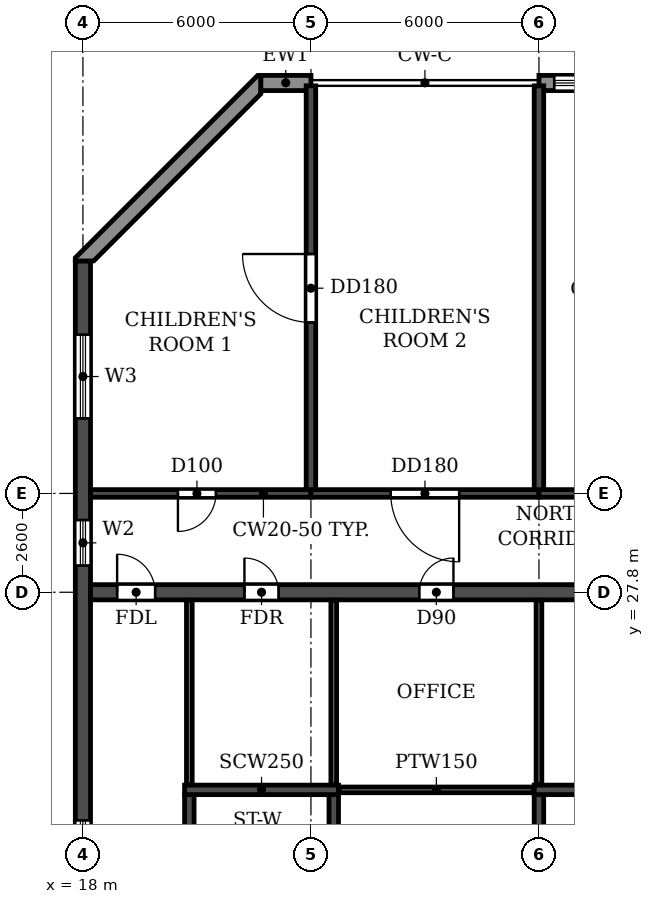
"""IFC4 building model, lengths in metres.
Left out: names, types, materials, properties, quantities, classifications, styles, units other than length and angle.
Written with IfcOpenShell. Run it as: python <this file> out.ifc"""

import sys

from ifc_helpers import new_model, si_unit, direction, frame, frame_2d, origin, place, context, subcontext, project, spatial, polyline, rectangle, outline, extrude, element, fill, save


model = new_model("IFC4")
c1 = context("Model", 3, precision=1e-05, world=origin(), true_north=direction((0.0, 1.0)))
c2 = subcontext(c1, "Body", "Model", "MODEL_VIEW")
j1 = project(units=[si_unit("LENGTHUNIT", "METRE"), si_unit("PLANEANGLEUNIT", "RADIAN")], contexts=[c1])
p1 = place(None, origin())
s1 = spatial("IfcSite", under=j1, at=p1, CompositionType="ELEMENT")
p2 = place(p1, origin())
s2 = spatial("IfcBuilding", under=s1, at=p2, CompositionType="ELEMENT")
p3 = place(p2, frame((0.0, 0.0, 211.5)))
s3 = spatial("IfcBuildingStorey", under=s2, at=p3, CompositionType="ELEMENT", Elevation=211.5)
p4 = place(p3, frame((24.0, 30.5, 0.0), z_axis=(0.0, 0.0, 1.0), x_axis=(0.0, 1.0, 0.0)))
e1 = element("IfcWall", 1, at=p4, inside=s3, PredefinedType="SHEAR", context=c2, shape_type="SweptSolid", body=[
    extrude(rectangle(XDim=10.625, YDim=0.25, at=frame_2d((5.312, 0.0))), origin(), (0.0, 0.0, 1.0), 2.95),
])
p5 = place(p4, frame((4.4, 0.0, 0.0)))
e2 = element("IfcOpeningElement", 2, at=p5, cuts=e1, PredefinedType="OPENING", context=c2, shape_type="SweptSolid", body=[
    extrude(rectangle(XDim=1.8, YDim=2.1, at=frame_2d((0.9, 1.05))), frame((0.0, 0.135, 0.0), z_axis=(0.0, -1.0, 0.0), x_axis=(1.0, 0.0, 0.0)), (0.0, 0.0, 1.0), 0.27),
])
p6 = place(p3, frame((30.0, 30.5, 0.0), z_axis=(0.0, 0.0, 1.0), x_axis=(0.0, 1.0, 0.0)))
e3 = element("IfcWall", 3, at=p6, inside=s3, PredefinedType="SHEAR", context=c2, shape_type="SweptSolid", body=[
    extrude(rectangle(XDim=10.625, YDim=0.25, at=frame_2d((5.312, 0.0))), origin(), (0.0, 0.0, 1.0), 2.95),
])
p7 = place(p3, frame((18.0, 4.683, 0.0), z_axis=(0.0, 0.0, 1.0), x_axis=(0.0, 1.0, 0.0)))
e4 = element("IfcWall", 4, at=p7, inside=s3, PredefinedType="SHEAR", context=c2, shape_type="SweptSolid", body=[
    extrude(rectangle(XDim=31.834, YDim=0.4, at=frame_2d((15.917, 0.0))), origin(), (0.0, 0.0, 1.0), 2.95),
])
p8 = place(p7, frame((23.817, 0.0, 0.9)))
e5 = element("IfcOpeningElement", 5, at=p8, cuts=e4, PredefinedType="OPENING", context=c2, shape_type="SweptSolid", body=[
    extrude(rectangle(XDim=1.2, YDim=1.5, at=frame_2d((0.6, 0.75))), frame((0.0, 0.21, 0.0), z_axis=(0.0, -1.0, 0.0), x_axis=(1.0, 0.0, 0.0)), (0.0, 0.0, 1.0), 0.42),
])
p9 = place(p7, frame((8.017, 0.0, 0.9)))
e6 = element("IfcOpeningElement", 6, at=p9, cuts=e4, PredefinedType="OPENING", context=c2, shape_type="SweptSolid", body=[
    extrude(rectangle(XDim=1.2, YDim=1.5, at=frame_2d((0.6, 0.75))), frame((0.0, 0.21, 0.0), z_axis=(0.0, -1.0, 0.0), x_axis=(1.0, 0.0, 0.0)), (0.0, 0.0, 1.0), 0.42),
])
p10 = place(p7, frame((27.694, 0.0, 0.6)))
e7 = element("IfcOpeningElement", 7, at=p10, cuts=e4, PredefinedType="OPENING", context=c2, shape_type="SweptSolid", body=[
    extrude(rectangle(XDim=2.2, YDim=1.8, at=frame_2d((1.1, 0.9))), frame((0.0, 0.21, 0.0), z_axis=(0.0, -1.0, 0.0), x_axis=(1.0, 0.0, 0.0)), (0.0, 0.0, 1.0), 0.42),
])
p11 = place(p7, frame((2.541, 0.0, 0.6)))
e8 = element("IfcOpeningElement", 8, at=p11, cuts=e4, PredefinedType="OPENING", context=c2, shape_type="SweptSolid", body=[
    extrude(rectangle(XDim=2.2, YDim=1.8, at=frame_2d((1.1, 0.9))), frame((0.0, 0.21, 0.0), z_axis=(0.0, -1.0, 0.0), x_axis=(1.0, 0.0, 0.0)), (0.0, 0.0, 1.0), 0.42),
])
p12 = place(p7, frame((15.917, 0.0, 0.9)))
e9 = element("IfcOpeningElement", 9, at=p12, cuts=e4, PredefinedType="OPENING", context=c2, shape_type="SweptSolid", body=[
    extrude(rectangle(XDim=1.2, YDim=1.5, at=frame_2d((0.6, 0.75))), frame((0.0, 0.21, 0.0), z_axis=(0.0, -1.0, 0.0), x_axis=(1.0, 0.0, 0.0)), (0.0, 0.0, 1.0), 0.42),
])
p13 = place(p3, frame((18.2, 30.4, 0.0), z_axis=(0.0, 0.0, 1.0), x_axis=(1.0, 0.0, 0.0)))
e10 = element("IfcWall", 10, at=p13, inside=s3, PredefinedType="SHEAR", context=c2, shape_type="SweptSolid", body=[
    extrude(rectangle(XDim=5.8, YDim=0.2, at=frame_2d((2.9, 0.0))), origin(), (0.0, 0.0, 1.0), 2.35),
])
p14 = place(p13, frame((2.3, 0.0, 0.0)))
e11 = element("IfcOpeningElement", 11, at=p14, cuts=e10, PredefinedType="OPENING", context=c2, shape_type="SweptSolid", body=[
    extrude(rectangle(XDim=1.0, YDim=2.1, at=frame_2d((0.5, 1.05))), frame((0.0, 0.11, 0.0), z_axis=(0.0, -1.0, 0.0), x_axis=(1.0, 0.0, 0.0)), (0.0, 0.0, 1.0), 0.22),
])
p15 = place(p3, frame((24.0, 30.4, 0.0), z_axis=(0.0, 0.0, 1.0), x_axis=(1.0, 0.0, 0.0)))
e12 = element("IfcWall", 12, at=p15, inside=s3, PredefinedType="SHEAR", context=c2, shape_type="SweptSolid", body=[
    extrude(rectangle(XDim=6.0, YDim=0.2, at=frame_2d((3.0, 0.0))), origin(), (0.0, 0.0, 1.0), 2.35),
])
p16 = place(p15, frame((2.1, 0.0, 0.0)))
e13 = element("IfcOpeningElement", 13, at=p16, cuts=e12, PredefinedType="OPENING", context=c2, shape_type="SweptSolid", body=[
    extrude(rectangle(XDim=1.8, YDim=2.1, at=frame_2d((0.9, 1.05))), frame((0.0, 0.11, 0.0), z_axis=(0.0, -1.0, 0.0), x_axis=(1.0, 0.0, 0.0)), (0.0, 0.0, 1.0), 0.22),
])
p17 = place(p3, frame((30.0, 30.4, 0.0), z_axis=(0.0, 0.0, 1.0), x_axis=(1.0, 0.0, 0.0)))
e14 = element("IfcWall", 14, at=p17, inside=s3, PredefinedType="SHEAR", context=c2, shape_type="SweptSolid", body=[
    extrude(rectangle(XDim=6.0, YDim=0.2, at=frame_2d((3.0, 0.0))), origin(), (0.0, 0.0, 1.0), 2.35),
])
p18 = place(p17, frame((2.1, 0.0, 0.0)))
e15 = element("IfcOpeningElement", 15, at=p18, cuts=e14, PredefinedType="OPENING", context=c2, shape_type="SweptSolid", body=[
    extrude(rectangle(XDim=1.8, YDim=2.1, at=frame_2d((0.9, 1.05))), frame((0.0, 0.11, 0.0), z_axis=(0.0, -1.0, 0.0), x_axis=(1.0, 0.0, 0.0)), (0.0, 0.0, 1.0), 0.22),
])
p19 = place(p3, frame((18.2, 27.8, 0.0), z_axis=(0.0, 0.0, 1.0), x_axis=(1.0, 0.0, 0.0)))
e16 = element("IfcWall", 16, at=p19, inside=s3, PredefinedType="SOLIDWALL", context=c2, shape_type="SweptSolid", body=[
    extrude(rectangle(XDim=65.6, YDim=0.4, at=frame_2d((32.8, 0.0))), origin(), (0.0, 0.0, 1.0), 2.95),
])
p20 = place(p19, frame((0.7, 0.0, 0.0)))
e17 = element("IfcOpeningElement", 17, at=p20, cuts=e16, PredefinedType="OPENING", context=c2, shape_type="SweptSolid", body=[
    extrude(rectangle(XDim=1.0, YDim=2.1, at=frame_2d((0.5, 1.05))), frame((0.0, 0.21, 0.0), z_axis=(0.0, -1.0, 0.0), x_axis=(1.0, 0.0, 0.0)), (0.0, 0.0, 1.0), 0.42),
])
p21 = place(p19, frame((4.05, 0.0, 0.0)))
e18 = element("IfcOpeningElement", 18, at=p21, cuts=e16, PredefinedType="OPENING", context=c2, shape_type="SweptSolid", body=[
    extrude(rectangle(XDim=0.9, YDim=2.1, at=frame_2d((0.45, 1.05))), frame((0.0, 0.21, 0.0), z_axis=(0.0, -1.0, 0.0), x_axis=(1.0, 0.0, 0.0)), (0.0, 0.0, 1.0), 0.42),
])
p22 = place(p19, frame((8.65, 0.0, 0.0)))
e19 = element("IfcOpeningElement", 19, at=p22, cuts=e16, PredefinedType="OPENING", context=c2, shape_type="SweptSolid", body=[
    extrude(rectangle(XDim=0.9, YDim=2.1, at=frame_2d((0.45, 1.05))), frame((0.0, 0.21, 0.0), z_axis=(0.0, -1.0, 0.0), x_axis=(1.0, 0.0, 0.0)), (0.0, 0.0, 1.0), 0.42),
])
p23 = place(p19, frame((13.25, 0.0, 0.0)))
e20 = element("IfcOpeningElement", 20, at=p23, cuts=e16, PredefinedType="OPENING", context=c2, shape_type="SweptSolid", body=[
    extrude(rectangle(XDim=0.9, YDim=2.1, at=frame_2d((0.45, 1.05))), frame((0.0, 0.21, 0.0), z_axis=(0.0, -1.0, 0.0), x_axis=(1.0, 0.0, 0.0)), (0.0, 0.0, 1.0), 0.42),
])
p24 = place(p19, frame((16.4, 0.0, 0.0)))
e21 = element("IfcOpeningElement", 21, at=p24, cuts=e16, PredefinedType="OPENING", context=c2, shape_type="SweptSolid", body=[
    extrude(rectangle(XDim=1.0, YDim=2.1, at=frame_2d((0.5, 1.05))), frame((0.0, 0.21, 0.0), z_axis=(0.0, -1.0, 0.0), x_axis=(1.0, 0.0, 0.0)), (0.0, 0.0, 1.0), 0.42),
])
p25 = place(p19, frame((21.6, 0.0, 0.0)))
e22 = element("IfcOpeningElement", 22, at=p25, cuts=e16, PredefinedType="OPENING", context=c2, shape_type="SweptSolid", body=[
    extrude(rectangle(XDim=1.0, YDim=2.1, at=frame_2d((0.5, 1.05))), frame((0.0, 0.21, 0.0), z_axis=(0.0, -1.0, 0.0), x_axis=(1.0, 0.0, 0.0)), (0.0, 0.0, 1.0), 0.42),
])
p26 = place(p19, frame((29.4, 0.0, 0.0)))
e23 = element("IfcOpeningElement", 23, at=p26, cuts=e16, PredefinedType="OPENING", context=c2, shape_type="SweptSolid", body=[
    extrude(rectangle(XDim=1.0, YDim=2.1, at=frame_2d((0.5, 1.05))), frame((0.0, 0.21, 0.0), z_axis=(0.0, -1.0, 0.0), x_axis=(1.0, 0.0, 0.0)), (0.0, 0.0, 1.0), 0.42),
])
p27 = place(p19, frame((32.3, 0.0, 0.0)))
e24 = element("IfcOpeningElement", 24, at=p27, cuts=e16, PredefinedType="OPENING", context=c2, shape_type="SweptSolid", body=[
    extrude(rectangle(XDim=1.0, YDim=2.1, at=frame_2d((0.5, 1.05))), frame((0.0, 0.21, 0.0), z_axis=(0.0, -1.0, 0.0), x_axis=(1.0, 0.0, 0.0)), (0.0, 0.0, 1.0), 0.42),
])
p28 = place(p19, frame((36.25, 0.0, 0.0)))
e25 = element("IfcOpeningElement", 25, at=p28, cuts=e16, PredefinedType="OPENING", context=c2, shape_type="SweptSolid", body=[
    extrude(rectangle(XDim=1.5, YDim=2.1, at=frame_2d((0.75, 1.05))), frame((0.0, 0.21, 0.0), z_axis=(0.0, -1.0, 0.0), x_axis=(1.0, 0.0, 0.0)), (0.0, 0.0, 1.0), 0.42),
])
p29 = place(p19, frame((41.7, 0.0, 0.0)))
e26 = element("IfcOpeningElement", 26, at=p29, cuts=e16, PredefinedType="OPENING", context=c2, shape_type="SweptSolid", body=[
    extrude(rectangle(XDim=1.0, YDim=2.1, at=frame_2d((0.5, 1.05))), frame((0.0, 0.21, 0.0), z_axis=(0.0, -1.0, 0.0), x_axis=(1.0, 0.0, 0.0)), (0.0, 0.0, 1.0), 0.42),
])
p30 = place(p19, frame((45.6, 0.0, 0.0)))
e27 = element("IfcOpeningElement", 27, at=p30, cuts=e16, PredefinedType="OPENING", context=c2, shape_type="SweptSolid", body=[
    extrude(rectangle(XDim=1.0, YDim=2.1, at=frame_2d((0.5, 1.05))), frame((0.0, 0.21, 0.0), z_axis=(0.0, -1.0, 0.0), x_axis=(1.0, 0.0, 0.0)), (0.0, 0.0, 1.0), 0.42),
])
p31 = place(p19, frame((48.2, 0.0, 0.0)))
e28 = element("IfcOpeningElement", 28, at=p31, cuts=e16, PredefinedType="OPENING", context=c2, shape_type="SweptSolid", body=[
    extrude(rectangle(XDim=1.0, YDim=2.1, at=frame_2d((0.5, 1.05))), frame((0.0, 0.21, 0.0), z_axis=(0.0, -1.0, 0.0), x_axis=(1.0, 0.0, 0.0)), (0.0, 0.0, 1.0), 0.42),
])
p32 = place(p19, frame((51.45, 0.0, 0.0)))
e29 = element("IfcOpeningElement", 29, at=p32, cuts=e16, PredefinedType="OPENING", context=c2, shape_type="SweptSolid", body=[
    extrude(rectangle(XDim=0.9, YDim=2.1, at=frame_2d((0.45, 1.05))), frame((0.0, 0.21, 0.0), z_axis=(0.0, -1.0, 0.0), x_axis=(1.0, 0.0, 0.0)), (0.0, 0.0, 1.0), 0.42),
])
p33 = place(p19, frame((56.05, 0.0, 0.0)))
e30 = element("IfcOpeningElement", 30, at=p33, cuts=e16, PredefinedType="OPENING", context=c2, shape_type="SweptSolid", body=[
    extrude(rectangle(XDim=0.9, YDim=2.1, at=frame_2d((0.45, 1.05))), frame((0.0, 0.21, 0.0), z_axis=(0.0, -1.0, 0.0), x_axis=(1.0, 0.0, 0.0)), (0.0, 0.0, 1.0), 0.42),
])
p34 = place(p19, frame((60.65, 0.0, 0.0)))
e31 = element("IfcOpeningElement", 31, at=p34, cuts=e16, PredefinedType="OPENING", context=c2, shape_type="SweptSolid", body=[
    extrude(rectangle(XDim=0.9, YDim=2.1, at=frame_2d((0.45, 1.05))), frame((0.0, 0.21, 0.0), z_axis=(0.0, -1.0, 0.0), x_axis=(1.0, 0.0, 0.0)), (0.0, 0.0, 1.0), 0.42),
])
p35 = place(p19, frame((63.9, 0.0, 0.0)))
e32 = element("IfcOpeningElement", 32, at=p35, cuts=e16, PredefinedType="OPENING", context=c2, shape_type="SweptSolid", body=[
    extrude(rectangle(XDim=1.0, YDim=2.1, at=frame_2d((0.5, 1.05))), frame((0.0, 0.21, 0.0), z_axis=(0.0, -1.0, 0.0), x_axis=(1.0, 0.0, 0.0)), (0.0, 0.0, 1.0), 0.42),
])
p36 = place(p3, frame((30.0, 14.8, 0.0), z_axis=(0.0, 0.0, 1.0), x_axis=(0.0, 1.0, 0.0)))
e33 = element("IfcWall", 33, at=p36, inside=s3, PredefinedType="SOLIDWALL", context=c2, shape_type="SweptSolid", body=[
    extrude(rectangle(XDim=7.675, YDim=0.25, at=frame_2d((3.837, 0.0))), origin(), (0.0, 0.0, 1.0), 2.95),
])
p37 = place(p3, frame((29.875, 22.6, 0.0), z_axis=(0.0, 0.0, 1.0), x_axis=(1.0, 0.0, 0.0)))
e34 = element("IfcWall", 34, at=p37, inside=s3, PredefinedType="SOLIDWALL", context=c2, shape_type="SweptSolid", body=[
    extrude(rectangle(XDim=4.05, YDim=0.25, at=frame_2d((2.025, 0.0))), origin(), (0.0, 0.0, 1.0), 2.95),
])
p38 = place(p3, frame((20.8, 14.8, 0.0), z_axis=(0.0, 0.0, 1.0), x_axis=(0.0, 1.0, 0.0)))
e35 = element("IfcWall", 35, at=p38, inside=s3, PredefinedType="SOLIDWALL", context=c2, shape_type="SweptSolid", body=[
    extrude(rectangle(XDim=7.675, YDim=0.25, at=frame_2d((3.837, 0.0))), origin(), (0.0, 0.0, 1.0), 2.95),
])
p39 = place(p38, frame((0.5, 0.0, 0.0)))
e36 = element("IfcOpeningElement", 36, at=p39, cuts=e35, PredefinedType="OPENING", context=c2, shape_type="SweptSolid", body=[
    extrude(rectangle(XDim=1.0, YDim=2.1, at=frame_2d((0.5, 1.05))), frame((0.0, 0.135, 0.0), z_axis=(0.0, -1.0, 0.0), x_axis=(1.0, 0.0, 0.0)), (0.0, 0.0, 1.0), 0.27),
])
p40 = place(p3, frame((24.6, 14.8, 0.0), z_axis=(0.0, 0.0, 1.0), x_axis=(0.0, 1.0, 0.0)))
e37 = element("IfcWall", 37, at=p40, inside=s3, PredefinedType="SOLIDWALL", context=c2, shape_type="SweptSolid", body=[
    extrude(rectangle(XDim=7.675, YDim=0.25, at=frame_2d((3.837, 0.0))), origin(), (0.0, 0.0, 1.0), 2.95),
])
p41 = place(p3, frame((20.675, 22.6, 0.0), z_axis=(0.0, 0.0, 1.0), x_axis=(1.0, 0.0, 0.0)))
e38 = element("IfcWall", 38, at=p41, inside=s3, PredefinedType="SOLIDWALL", context=c2, shape_type="SweptSolid", body=[
    extrude(rectangle(XDim=4.05, YDim=0.25, at=frame_2d((2.025, 0.0))), origin(), (0.0, 0.0, 1.0), 2.95),
])
p42 = place(p3, frame((66.0, 41.2, 0.0), z_axis=(0.0, 0.0, 1.0), x_axis=(-1.0, 0.0, 0.0)))
e39 = element("IfcWall", 39, at=p42, inside=s3, PredefinedType="STANDARD", context=c2, shape_type="SweptSolid", body=[
    extrude(rectangle(XDim=36.0, YDim=0.4, at=frame_2d((18.0, 0.0))), origin(), (0.0, 0.0, 1.0), 2.95),
])
p43 = place(p42, frame((33.4, 0.0, 0.6)))
e40 = element("IfcOpeningElement", 40, at=p43, cuts=e39, PredefinedType="OPENING", context=c2, shape_type="SweptSolid", body=[
    extrude(rectangle(XDim=2.2, YDim=1.8, at=frame_2d((1.1, 0.9))), frame((0.0, 0.21, 0.0), z_axis=(0.0, -1.0, 0.0), x_axis=(1.0, 0.0, 0.0)), (0.0, 0.0, 1.0), 0.42),
])
p44 = place(p42, frame((30.4, 0.0, 0.6)))
e41 = element("IfcOpeningElement", 41, at=p44, cuts=e39, PredefinedType="OPENING", context=c2, shape_type="SweptSolid", body=[
    extrude(rectangle(XDim=2.2, YDim=1.8, at=frame_2d((1.1, 0.9))), frame((0.0, 0.21, 0.0), z_axis=(0.0, -1.0, 0.0), x_axis=(1.0, 0.0, 0.0)), (0.0, 0.0, 1.0), 0.42),
])
p45 = place(p42, frame((21.4, 0.0, 0.6)))
e42 = element("IfcOpeningElement", 42, at=p45, cuts=e39, PredefinedType="OPENING", context=c2, shape_type="SweptSolid", body=[
    extrude(rectangle(XDim=2.2, YDim=1.8, at=frame_2d((1.1, 0.9))), frame((0.0, 0.21, 0.0), z_axis=(0.0, -1.0, 0.0), x_axis=(1.0, 0.0, 0.0)), (0.0, 0.0, 1.0), 0.42),
])
p46 = place(p42, frame((18.4, 0.0, 0.6)))
e43 = element("IfcOpeningElement", 43, at=p46, cuts=e39, PredefinedType="OPENING", context=c2, shape_type="SweptSolid", body=[
    extrude(rectangle(XDim=2.2, YDim=1.8, at=frame_2d((1.1, 0.9))), frame((0.0, 0.21, 0.0), z_axis=(0.0, -1.0, 0.0), x_axis=(1.0, 0.0, 0.0)), (0.0, 0.0, 1.0), 0.42),
])
p47 = place(p3, frame((24.0, 41.2, 0.0), z_axis=(0.0, 0.0, 1.0), x_axis=(-1.0, 0.0, 0.0)))
e44 = element("IfcWall", 44, at=p47, inside=s3, PredefinedType="STANDARD", context=c2, shape_type="SweptSolid", body=[
    extrude(rectangle(XDim=1.317, YDim=0.4, at=frame_2d((0.659, 0.0))), origin(), (0.0, 0.0, 1.0), 2.95),
])
p48 = place(p3, origin())
e45 = element("IfcWall", 45, at=p48, inside=s3, PredefinedType="STANDARD", context=c2, shape_type="SweptSolid", body=[
    extrude(outline(polyline([(22.683, 41.4), (22.6, 41.4), (17.8, 36.6), (17.8, 36.517), (18.283, 36.517), (22.683, 40.917), (22.683, 41.4)])), origin(), (0.0, 0.0, 1.0), 2.95),
])
p49 = place(p3, frame((24.735, 22.6, 0.0), z_axis=(0.0, 0.0, 1.0), x_axis=(1.0, 0.0, 0.0)))
e46 = element("IfcWall", 46, at=p49, inside=s3, PredefinedType="PARTITIONING", context=c2, shape_type="SweptSolid", body=[
    extrude(rectangle(XDim=5.13, YDim=0.15, at=frame_2d((2.565, 0.0))), origin(), (0.0, 0.0, 1.0), 2.95),
])
for number, where, z_axis, x_axis in (
    (47, (20.8, 22.735, 0.0), (0.0, 0.0, 1.0), (0.0, 1.0, 0.0)),
    (48, (24.6, 22.735, 0.0), (0.0, 0.0, 1.0), (0.0, 1.0, 0.0)),
    (49, (30.0, 22.735, 0.0), (0.0, 0.0, 1.0), (0.0, 1.0, 0.0)),
):
    element("IfcWall", number, at=place(p3, frame(where, z_axis=z_axis, x_axis=x_axis)), inside=s3, PredefinedType="PARTITIONING", context=c2, shape_type="SweptSolid", body=[
        extrude(rectangle(XDim=4.855, YDim=0.15, at=frame_2d((2.427, 0.0))), origin(), (0.0, 0.0, 1.0), 2.95),
    ])
p50 = place(p43, origin())
e50 = element("IfcWindow", 50, at=p50, inside=s3, PartitioningType="DOUBLE_PANEL_HORIZONTAL", PredefinedType="WINDOW", context=c2, shape_type="SweptSolid", body=[
    extrude(rectangle(XDim=2.2, YDim=1.8, at=frame_2d((1.1, 0.9))), frame((0.0, 0.03, 0.0), z_axis=(0.0, -1.0, 0.0), x_axis=(1.0, 0.0, 0.0)), (0.0, 0.0, 1.0), 0.06),
])
fill(e40, e50)
p51 = place(p8, origin())
e51 = element("IfcWindow", 51, at=p51, inside=s3, PartitioningType="SINGLE_PANEL", PredefinedType="WINDOW", context=c2, shape_type="SweptSolid", body=[
    extrude(rectangle(XDim=1.2, YDim=1.5, at=frame_2d((0.6, 0.75))), frame((0.0, 0.03, 0.0), z_axis=(0.0, -1.0, 0.0), x_axis=(1.0, 0.0, 0.0)), (0.0, 0.0, 1.0), 0.06),
])
fill(e5, e51)
p52 = place(p10, origin())
e52 = element("IfcWindow", 52, at=p52, inside=s3, PartitioningType="DOUBLE_PANEL_HORIZONTAL", PredefinedType="WINDOW", context=c2, shape_type="SweptSolid", body=[
    extrude(rectangle(XDim=2.2, YDim=1.8, at=frame_2d((1.1, 0.9))), frame((0.0, 0.03, 0.0), z_axis=(0.0, -1.0, 0.0), x_axis=(1.0, 0.0, 0.0)), (0.0, 0.0, 1.0), 0.06),
])
fill(e7, e52)
p53 = place(p12, origin())
e53 = element("IfcWindow", 53, at=p53, inside=s3, PartitioningType="SINGLE_PANEL", PredefinedType="WINDOW", context=c2, shape_type="SweptSolid", body=[
    extrude(rectangle(XDim=1.2, YDim=1.5, at=frame_2d((0.6, 0.75))), frame((0.0, 0.03, 0.0), z_axis=(0.0, -1.0, 0.0), x_axis=(1.0, 0.0, 0.0)), (0.0, 0.0, 1.0), 0.06),
])
fill(e9, e53)
p54 = place(p20, origin())
e54 = element("IfcDoor", 54, at=p54, inside=s3, OperationType="SINGLE_SWING_LEFT", PredefinedType="DOOR", context=c2, shape_type="SweptSolid", body=[
    extrude(rectangle(XDim=1.0, YDim=2.1, at=frame_2d((0.5, 1.05))), frame((0.0, 0.025, 0.0), z_axis=(0.0, -1.0, 0.0), x_axis=(1.0, 0.0, 0.0)), (0.0, 0.0, 1.0), 0.05),
])
fill(e17, e54)
p55 = place(p14, frame((1.0, 0.0, 0.0), z_axis=(0.0, 0.0, 1.0), x_axis=(-1.0, 0.0, 0.0)))
e55 = element("IfcDoor", 55, at=p55, inside=s3, OperationType="SINGLE_SWING_RIGHT", PredefinedType="DOOR", context=c2, shape_type="SweptSolid", body=[
    extrude(rectangle(XDim=1.0, YDim=2.1, at=frame_2d((0.5, 1.05))), frame((0.0, 0.025, 0.0), z_axis=(0.0, -1.0, 0.0), x_axis=(1.0, 0.0, 0.0)), (0.0, 0.0, 1.0), 0.05),
])
fill(e11, e55)
p56 = place(p21, origin())
e56 = element("IfcDoor", 56, at=p56, inside=s3, OperationType="SINGLE_SWING_LEFT", PredefinedType="DOOR", context=c2, shape_type="SweptSolid", body=[
    extrude(rectangle(XDim=0.9, YDim=2.1, at=frame_2d((0.45, 1.05))), frame((0.0, 0.025, 0.0), z_axis=(0.0, -1.0, 0.0), x_axis=(1.0, 0.0, 0.0)), (0.0, 0.0, 1.0), 0.05),
])
fill(e18, e56)
p57 = place(p16, frame((1.8, 0.0, 0.0), z_axis=(0.0, 0.0, 1.0), x_axis=(-1.0, 0.0, 0.0)))
e57 = element("IfcDoor", 57, at=p57, inside=s3, OperationType="DOUBLE_DOOR_SINGLE_SWING", PredefinedType="DOOR", context=c2, shape_type="SweptSolid", body=[
    extrude(rectangle(XDim=1.8, YDim=2.1, at=frame_2d((0.9, 1.05))), frame((0.0, 0.025, 0.0), z_axis=(0.0, -1.0, 0.0), x_axis=(1.0, 0.0, 0.0)), (0.0, 0.0, 1.0), 0.05),
])
fill(e13, e57)
p58 = place(p22, origin())
e58 = element("IfcDoor", 58, at=p58, inside=s3, OperationType="SINGLE_SWING_RIGHT", PredefinedType="DOOR", context=c2, shape_type="SweptSolid", body=[
    extrude(rectangle(XDim=0.9, YDim=2.1, at=frame_2d((0.45, 1.05))), frame((0.0, 0.025, 0.0), z_axis=(0.0, -1.0, 0.0), x_axis=(1.0, 0.0, 0.0)), (0.0, 0.0, 1.0), 0.05),
])
fill(e19, e58)
p59 = place(p5, origin())
e59 = element("IfcDoor", 59, at=p59, inside=s3, OperationType="DOUBLE_DOOR_SINGLE_SWING", PredefinedType="DOOR", context=c2, shape_type="SweptSolid", body=[
    extrude(rectangle(XDim=1.8, YDim=2.1, at=frame_2d((0.9, 1.05))), frame((0.0, 0.025, 0.0), z_axis=(0.0, -1.0, 0.0), x_axis=(1.0, 0.0, 0.0)), (0.0, 0.0, 1.0), 0.05),
])
fill(e2, e59)
save(model, sys.argv[1])
